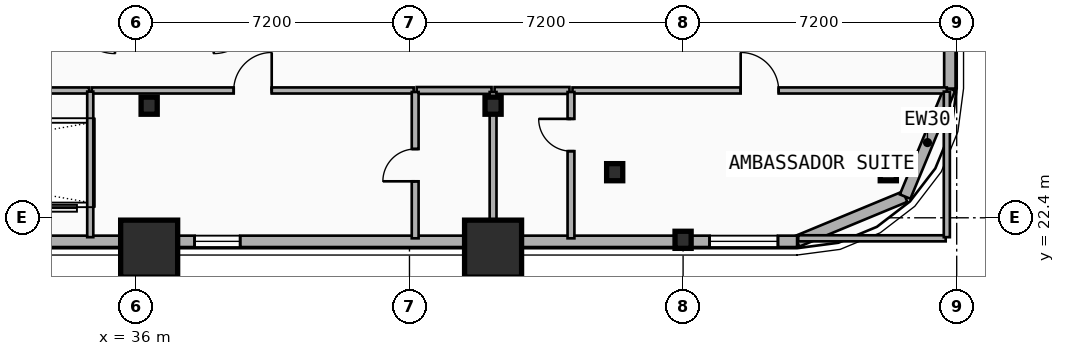
"""IFC4 building model, lengths in metres.
Left out: names, types, materials, properties, quantities, classifications, styles, units other than length and angle.
Written with IfcOpenShell. Run it as: python <this file> out.ifc"""

import sys

from ifc_helpers import new_model, si_unit, direction, frame, frame_2d, origin, origin_2d, place, context, subcontext, project, spatial, rectangle, i_section, extrude, element, fill, save


model = new_model("IFC4")
c1 = context("Model", 3, precision=1e-05, world=origin(), true_north=direction((0.0, 1.0)))
c2 = subcontext(c1, "Body", "Model", "MODEL_VIEW")
j1 = project(units=[si_unit("LENGTHUNIT", "METRE"), si_unit("PLANEANGLEUNIT", "RADIAN")], contexts=[c1])
p1 = place(None, origin())
s1 = spatial("IfcSite", under=j1, at=p1, CompositionType="ELEMENT")
p2 = place(p1, origin())
s2 = spatial("IfcBuilding", under=s1, at=p2, CompositionType="ELEMENT")
p3 = place(p2, frame((0.0, 0.0, 50.0)))
s3 = spatial("IfcBuildingStorey", under=s2, at=p3, CompositionType="ELEMENT", Elevation=50.0)
for number, where, z_axis, x_axis in (
    (1, (36.35, 25.35, 0.0), (0.0, 0.0, 1.0), (1.0, 0.0, 0.0)),
    (2, (45.4, 25.35, 0.0), (0.0, 0.0, 1.0), (1.0, 0.0, 0.0)),
):
    element("IfcColumn", number, at=place(p3, frame(where, z_axis=z_axis, x_axis=x_axis)), inside=s3, PredefinedType="COLUMN", context=c2, shape_type="SweptSolid", body=[
        extrude(i_section(OverallWidth=0.424, OverallDepth=0.45, WebThickness=0.041, FlangeThickness=0.065, FilletRadius=0.015, at=origin_2d()), origin(), (0.0, 0.0, 1.0), 3.5),
    ])
for number, where, z_axis, x_axis in (
    (3, (36.35, 21.697, 0.0), (0.0, -0.09, 0.996), (1.0, 0.0, 0.0)),
    (4, (45.4, 21.697, 0.0), (0.0, -0.09, 0.996), (1.0, 0.0, 0.0)),
):
    element("IfcColumn", number, at=place(p3, frame(where, z_axis=z_axis, x_axis=x_axis)), inside=s3, PredefinedType="COLUMN", context=c2, shape_type="SweptSolid", body=[
        extrude(rectangle(XDim=1.5, YDim=1.5, at=origin_2d()), origin(), (0.0, 0.0, 1.0), 3.514),
    ])
p4 = place(p3, frame((48.6, 23.6, 0.0), z_axis=(0.0, 0.0, 1.0), x_axis=(1.0, 0.0, 0.0)))
e5 = element("IfcColumn", 5, at=p4, inside=s3, PredefinedType="COLUMN", context=c2, shape_type="SweptSolid", body=[
    extrude(i_section(OverallWidth=0.424, OverallDepth=0.45, WebThickness=0.041, FlangeThickness=0.065, FilletRadius=0.015, at=origin_2d()), origin(), (0.0, 0.0, 1.0), 3.5),
])
p5 = place(p3, frame((50.4, 21.917, 0.0), z_axis=(0.0, -0.079960777917, 0.996798010629), x_axis=(1.0, 0.0, 0.0)))
e6 = element("IfcColumn", 6, at=p5, inside=s3, PredefinedType="COLUMN", context=c2, shape_type="SweptSolid", body=[
    extrude(i_section(OverallWidth=0.424, OverallDepth=0.45, WebThickness=0.041, FlangeThickness=0.065, FilletRadius=0.015, at=origin_2d()), origin(), (0.0, 0.0, 1.0), 3.511),
])
p6 = place(p3, frame((55.8, 23.6, 0.0), z_axis=(0.0, 0.0, 1.0), x_axis=(1.0, 0.0, 0.0)))
e7 = element("IfcColumn", 7, at=p6, inside=s3, PredefinedType="COLUMN", context=c2, shape_type="SweptSolid", body=[
    extrude(i_section(OverallWidth=0.424, OverallDepth=0.45, WebThickness=0.041, FlangeThickness=0.065, FilletRadius=0.015, at=origin_2d()), origin(), (0.0, 0.0, 1.0), 3.5),
])
p7 = place(p3, frame((56.243, 22.958, 0.0), z_axis=(0.0, 0.0, 1.0), x_axis=(-0.923882414032, -0.382676475685, 0.0)))
e8 = element("IfcWall", 8, at=p7, inside=s3, PredefinedType="SOLIDWALL", context=c2, shape_type="SweptSolid", body=[
    extrude(rectangle(XDim=3.077, YDim=0.3, at=frame_2d((1.539, 0.0))), origin(), (0.0, 0.0, 1.0), 3.24),
])
p8 = place(p3, frame((57.42, 25.8, 0.0), z_axis=(0.0, 0.0, 1.0), x_axis=(-0.382636798336, -0.92389884758, 0.0)))
e9 = element("IfcWall", 9, at=p8, inside=s3, PredefinedType="SOLIDWALL", context=c2, shape_type="SweptSolid", body=[
    extrude(rectangle(XDim=3.077, YDim=0.3, at=frame_2d((1.538, 0.0))), origin(), (0.0, 0.0, 1.0), 3.24),
])
p9 = place(p3, frame((57.42, 41.0, 0.0), z_axis=(0.0, 0.0, 1.0), x_axis=(0.0, -1.0, 0.0)))
e10 = element("IfcWall", 10, at=p9, inside=s3, PredefinedType="SOLIDWALL", context=c2, shape_type="SweptSolid", body=[
    extrude(rectangle(XDim=15.2, YDim=0.3, at=frame_2d((7.6, 0.0))), origin(), (0.0, 0.0, 1.0), 3.24),
])
p10 = place(p9, frame((10.882, 0.0, 0.48)))
e11 = element("IfcOpeningElement", 11, at=p10, cuts=e10, PredefinedType="OPENING", context=c2, shape_type="SweptSolid", body=[
    extrude(rectangle(XDim=1.4, YDim=1.8, at=frame_2d((0.7, 0.9))), frame((0.0, 0.16, 0.0), z_axis=(0.0, -1.0, 0.0), x_axis=(1.0, 0.0, 0.0)), (0.0, 0.0, 1.0), 0.32),
])
p11 = place(p9, frame((5.621, 0.0, 0.48)))
e12 = element("IfcOpeningElement", 12, at=p11, cuts=e10, PredefinedType="OPENING", context=c2, shape_type="SweptSolid", body=[
    extrude(rectangle(XDim=1.4, YDim=1.8, at=frame_2d((0.7, 0.9))), frame((0.0, 0.16, 0.0), z_axis=(0.0, -1.0, 0.0), x_axis=(1.0, 0.0, 0.0)), (0.0, 0.0, 1.0), 0.32),
])
p12 = place(p3, frame((53.4, 21.78, 0.0), z_axis=(0.0, 0.0, 1.0), x_axis=(-1.0, 0.0, 0.0)))
e13 = element("IfcWall", 13, at=p12, inside=s3, PredefinedType="SOLIDWALL", context=c2, shape_type="SweptSolid", body=[
    extrude(rectangle(XDim=49.2, YDim=0.3, at=frame_2d((24.6, 0.0))), origin(), (0.0, 0.0, 1.0), 2.82),
])
p13 = place(p12, frame((43.141, 0.0, 0.65)))
e14 = element("IfcOpeningElement", 14, at=p13, cuts=e13, PredefinedType="OPENING", context=c2, shape_type="SweptSolid", body=[
    extrude(rectangle(XDim=1.8, YDim=1.8, at=frame_2d((0.9, 0.9))), frame((0.0, 0.16, 0.0), z_axis=(0.0, -1.0, 0.0), x_axis=(1.0, 0.0, 0.0)), (0.0, 0.0, 1.0), 0.32),
])
p14 = place(p12, frame((38.805, 0.0, 0.48)))
e15 = element("IfcOpeningElement", 15, at=p14, cuts=e13, PredefinedType="OPENING", context=c2, shape_type="SweptSolid", body=[
    extrude(rectangle(XDim=1.2, YDim=1.5, at=frame_2d((0.6, 0.75))), frame((0.0, 0.16, 0.0), z_axis=(0.0, -1.0, 0.0), x_axis=(1.0, 0.0, 0.0)), (0.0, 0.0, 1.0), 0.32),
])
p15 = place(p12, frame((14.655, 0.0, 0.34)))
e16 = element("IfcOpeningElement", 16, at=p15, cuts=e13, PredefinedType="OPENING", context=c2, shape_type="SweptSolid", body=[
    extrude(rectangle(XDim=1.2, YDim=1.5, at=frame_2d((0.6, 0.75))), frame((0.0, 0.16, 0.0), z_axis=(0.0, -1.0, 0.0), x_axis=(1.0, 0.0, 0.0)), (0.0, 0.0, 1.0), 0.32),
])
p16 = place(p12, frame((0.504, 0.0, 0.65)))
e17 = element("IfcOpeningElement", 17, at=p16, cuts=e13, PredefinedType="OPENING", context=c2, shape_type="SweptSolid", body=[
    extrude(rectangle(XDim=1.8, YDim=1.8, at=frame_2d((0.9, 0.9))), frame((0.0, 0.16, 0.0), z_axis=(0.0, -1.0, 0.0), x_axis=(1.0, 0.0, 0.0)), (0.0, 0.0, 1.0), 0.32),
])
p17 = place(p3, frame((34.84, 25.75, 0.0), z_axis=(0.0, 0.0, 1.0), x_axis=(1.0, 0.0, 0.0)))
e18 = element("IfcWall", 18, at=p17, inside=s3, PredefinedType="PARTITIONING", context=c2, shape_type="SweptSolid", body=[
    extrude(rectangle(XDim=8.47, YDim=0.16, at=frame_2d((4.235, 0.0))), origin(), (0.0, 0.0, 1.0), 2.28),
])
p18 = place(p17, frame((3.735, 0.0, 0.0)))
e19 = element("IfcOpeningElement", 19, at=p18, cuts=e18, PredefinedType="OPENING", context=c2, shape_type="SweptSolid", body=[
    extrude(rectangle(XDim=1.0, YDim=2.15, at=frame_2d((0.5, 1.075))), frame((0.0, 0.09, 0.0), z_axis=(0.0, -1.0, 0.0), x_axis=(1.0, 0.0, 0.0)), (0.0, 0.0, 1.0), 0.18),
])
p19 = place(p3, frame((43.39, 25.75, 0.0), z_axis=(0.0, 0.0, 1.0), x_axis=(1.0, 0.0, 0.0)))
e20 = element("IfcWall", 20, at=p19, inside=s3, PredefinedType="PLUMBINGWALL", context=c2, shape_type="SweptSolid", body=[
    extrude(rectangle(XDim=1.97, YDim=0.18, at=frame_2d((0.985, 0.0))), origin(), (0.0, 0.0, 1.0), 2.28),
])
p20 = place(p3, frame((47.49, 25.75, 0.0), z_axis=(0.0, 0.0, 1.0), x_axis=(1.0, 0.0, 0.0)))
e21 = element("IfcWall", 21, at=p20, inside=s3, PredefinedType="PARTITIONING", context=c2, shape_type="SweptSolid", body=[
    extrude(rectangle(XDim=9.85, YDim=0.16, at=frame_2d((4.925, 0.0))), origin(), (0.0, 0.0, 1.0), 2.57),
])
p21 = place(p20, frame((4.425, 0.0, 0.0)))
e22 = element("IfcOpeningElement", 22, at=p21, cuts=e21, PredefinedType="OPENING", context=c2, shape_type="SweptSolid", body=[
    extrude(rectangle(XDim=1.0, YDim=2.15, at=frame_2d((0.5, 1.075))), frame((0.0, 0.09, 0.0), z_axis=(0.0, -1.0, 0.0), x_axis=(1.0, 0.0, 0.0)), (0.0, 0.0, 1.0), 0.18),
])
p22 = place(p3, frame((45.44, 25.75, 0.0), z_axis=(0.0, 0.0, 1.0), x_axis=(1.0, 0.0, 0.0)))
e23 = element("IfcWall", 23, at=p22, inside=s3, PredefinedType="PLUMBINGWALL", context=c2, shape_type="SweptSolid", body=[
    extrude(rectangle(XDim=1.97, YDim=0.18, at=frame_2d((0.985, 0.0))), origin(), (0.0, 0.0, 1.0), 2.28),
])
p23 = place(p3, frame((43.35, 21.86, 0.0), z_axis=(0.0, 0.0, 1.0), x_axis=(0.0, 1.0, 0.0)))
e24 = element("IfcWall", 24, at=p23, inside=s3, PredefinedType="PLUMBINGWALL", context=c2, shape_type="SweptSolid", body=[
    extrude(rectangle(XDim=3.85, YDim=0.18, at=frame_2d((1.925, 0.0))), origin(), (0.0, 0.0, 1.0), 2.77),
])
p24 = place(p23, frame((1.5, 0.0, 0.0)))
e25 = element("IfcOpeningElement", 25, at=p24, cuts=e24, PredefinedType="OPENING", context=c2, shape_type="SweptSolid", body=[
    extrude(rectangle(XDim=0.85, YDim=2.1, at=frame_2d((0.425, 1.05))), frame((0.0, 0.1, 0.0), z_axis=(0.0, -1.0, 0.0), x_axis=(1.0, 0.0, 0.0)), (0.0, 0.0, 1.0), 0.2),
])
p25 = place(p3, frame((45.4, 21.86, 0.0), z_axis=(0.0, 0.0, 1.0), x_axis=(0.0, 1.0, 0.0)))
e26 = element("IfcWall", 26, at=p25, inside=s3, PredefinedType="PLUMBINGWALL", context=c2, shape_type="SweptSolid", body=[
    extrude(rectangle(XDim=3.85, YDim=0.18, at=frame_2d((1.925, 0.0))), origin(), (0.0, 0.0, 1.0), 2.28),
])
p26 = place(p3, frame((47.45, 21.86, 0.0), z_axis=(0.0, 0.0, 1.0), x_axis=(0.0, 1.0, 0.0)))
e27 = element("IfcWall", 27, at=p26, inside=s3, PredefinedType="PLUMBINGWALL", context=c2, shape_type="SweptSolid", body=[
    extrude(rectangle(XDim=3.85, YDim=0.18, at=frame_2d((1.925, 0.0))), origin(), (0.0, 0.0, 1.0), 2.72),
])
p27 = place(p26, frame((2.293, 0.0, 0.0)))
e28 = element("IfcOpeningElement", 28, at=p27, cuts=e27, PredefinedType="OPENING", context=c2, shape_type="SweptSolid", body=[
    extrude(rectangle(XDim=0.85, YDim=2.1, at=frame_2d((0.425, 1.05))), frame((0.0, 0.1, 0.0), z_axis=(0.0, -1.0, 0.0), x_axis=(1.0, 0.0, 0.0)), (0.0, 0.0, 1.0), 0.2),
])
p28 = place(p3, frame((22.83, 25.75, 0.0), z_axis=(0.0, 0.0, 1.0), x_axis=(1.0, 0.0, 0.0)))
e29 = element("IfcWall", 29, at=p28, inside=s3, PredefinedType="PARTITIONING", context=c2, shape_type="SweptSolid", body=[
    extrude(rectangle(XDim=11.94, YDim=0.16, at=frame_2d((5.97, 0.0))), origin(), (0.0, 0.0, 1.0), 3.24),
])
p29 = place(p3, frame((34.8, 21.89, 0.0), z_axis=(0.0, 0.0, 1.0), x_axis=(0.0, 1.0, 0.0)))
e30 = element("IfcWall", 30, at=p29, inside=s3, PredefinedType="PARTITIONING", context=c2, shape_type="SweptSolid", body=[
    extrude(rectangle(XDim=3.83, YDim=0.16, at=frame_2d((1.915, 0.0))), origin(), (0.0, 0.0, 1.0), 2.68),
])
p30 = place(p3, frame((53.43, 21.86, 0.0), z_axis=(0.0, 0.0, 1.0), x_axis=(1.0, 0.0, 0.0)))
e31 = element("IfcWall", 31, at=p30, inside=s3, PredefinedType="PARTITIONING", context=c2, shape_type="SweptSolid", body=[
    extrude(rectangle(XDim=3.88, YDim=0.16, at=frame_2d((1.94, 0.0))), origin(), (0.0, 0.0, 1.0), 2.72),
])
p31 = place(p3, frame((57.34, 21.89, 0.0), z_axis=(0.0, 0.0, 1.0), x_axis=(0.0, 1.0, 0.0)))
e32 = element("IfcWall", 32, at=p31, inside=s3, PredefinedType="PARTITIONING", context=c2, shape_type="SweptSolid", body=[
    extrude(rectangle(XDim=3.83, YDim=0.16, at=frame_2d((1.915, 0.0))), origin(), (0.0, 0.0, 1.0), 3.24),
])
p32 = place(p15, origin())
e33 = element("IfcWindow", 33, at=p32, inside=s3, PartitioningType="SINGLE_PANEL", PredefinedType="WINDOW", context=c2, shape_type="SweptSolid", body=[
    extrude(rectangle(XDim=1.2, YDim=1.5, at=frame_2d((0.6, 0.75))), frame((0.0, 0.03, 0.0), z_axis=(0.0, -1.0, 0.0), x_axis=(1.0, 0.0, 0.0)), (0.0, 0.0, 1.0), 0.06),
])
fill(e16, e33)
p33 = place(p16, origin())
e34 = element("IfcWindow", 34, at=p33, inside=s3, PartitioningType="SINGLE_PANEL", PredefinedType="WINDOW", context=c2, shape_type="SweptSolid", body=[
    extrude(rectangle(XDim=1.8, YDim=1.8, at=frame_2d((0.9, 0.9))), frame((0.0, 0.03, 0.0), z_axis=(0.0, -1.0, 0.0), x_axis=(1.0, 0.0, 0.0)), (0.0, 0.0, 1.0), 0.06),
])
fill(e17, e34)
p34 = place(p18, origin())
e35 = element("IfcDoor", 35, at=p34, inside=s3, OperationType="SINGLE_SWING_RIGHT", PredefinedType="DOOR", context=c2, shape_type="SweptSolid", body=[
    extrude(rectangle(XDim=1.0, YDim=2.15, at=frame_2d((0.5, 1.075))), frame((0.0, 0.025, 0.0), z_axis=(0.0, -1.0, 0.0), x_axis=(1.0, 0.0, 0.0)), (0.0, 0.0, 1.0), 0.05),
])
fill(e19, e35)
p35 = place(p21, origin())
e36 = element("IfcDoor", 36, at=p35, inside=s3, OperationType="SINGLE_SWING_LEFT", PredefinedType="DOOR", context=c2, shape_type="SweptSolid", body=[
    extrude(rectangle(XDim=1.0, YDim=2.15, at=frame_2d((0.5, 1.075))), frame((0.0, 0.025, 0.0), z_axis=(0.0, -1.0, 0.0), x_axis=(1.0, 0.0, 0.0)), (0.0, 0.0, 1.0), 0.05),
])
fill(e22, e36)
p36 = place(p24, origin())
e37 = element("IfcDoor", 37, at=p36, inside=s3, OperationType="SINGLE_SWING_LEFT", PredefinedType="DOOR", context=c2, shape_type="SweptSolid", body=[
    extrude(rectangle(XDim=0.85, YDim=2.1, at=frame_2d((0.425, 1.05))), frame((0.0, 0.025, 0.0), z_axis=(0.0, -1.0, 0.0), x_axis=(1.0, 0.0, 0.0)), (0.0, 0.0, 1.0), 0.05),
])
fill(e25, e37)
p37 = place(p27, origin())
e38 = element("IfcDoor", 38, at=p37, inside=s3, OperationType="SINGLE_SWING_RIGHT", PredefinedType="DOOR", context=c2, shape_type="SweptSolid", body=[
    extrude(rectangle(XDim=0.85, YDim=2.1, at=frame_2d((0.425, 1.05))), frame((0.0, 0.025, 0.0), z_axis=(0.0, -1.0, 0.0), x_axis=(1.0, 0.0, 0.0)), (0.0, 0.0, 1.0), 0.05),
])
fill(e28, e38)
save(model, sys.argv[1])
